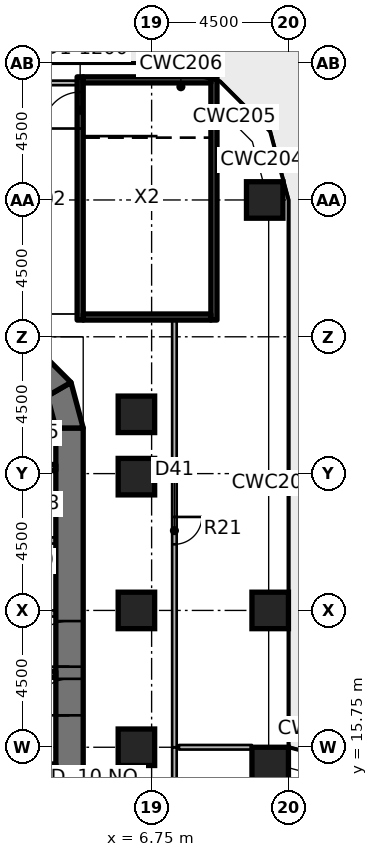
"""IFC4 building model, lengths in metres.
Left out: names, types, materials, properties, quantities, classifications, styles, units other than length and angle.
Written with IfcOpenShell. Run it as: python <this file> out.ifc"""

import sys

from ifc_helpers import new_model, si_unit, direction, frame, frame_2d, origin, origin_2d, place, context, subcontext, project, spatial, polyline, rectangle, outline, extrude, element, fill, save


model = new_model("IFC4")
c1 = context("Model", 3, precision=1e-05, world=origin(), true_north=direction((0.0, 1.0)))
c2 = subcontext(c1, "Body", "Model", "MODEL_VIEW")
j1 = project(units=[si_unit("LENGTHUNIT", "METRE"), si_unit("PLANEANGLEUNIT", "RADIAN")], contexts=[c1])
p1 = place(None, origin())
s1 = spatial("IfcSite", under=j1, at=p1, CompositionType="ELEMENT")
p2 = place(p1, origin())
s2 = spatial("IfcBuilding", under=s1, at=p2, CompositionType="ELEMENT")
p3 = place(p2, frame((0.0, 0.0, 22.0)))
s3 = spatial("IfcBuildingStorey", under=s2, at=p3, CompositionType="ELEMENT", Elevation=22.0)
for number, where, z_axis, x_axis in (
    (1, (6.25, 15.75, 0.0), (0.0, 0.0, 1.0), (1.0, 0.0, 0.0)),
    (2, (6.25, 20.25, 0.0), (0.0, 0.0, 1.0), (1.0, 0.0, 0.0)),
    (3, (6.25, 24.65, 0.0), (0.0, 0.0, 1.0), (1.0, 0.0, 0.0)),
    (4, (6.25, 26.7, 0.0), (0.0, 0.0, 1.0), (1.0, 0.0, 0.0)),
):
    element("IfcColumn", number, at=place(p3, frame(where, z_axis=z_axis, x_axis=x_axis)), inside=s3, PredefinedType="COLUMN", context=c2, shape_type="SweptSolid", body=[
        extrude(rectangle(XDim=1.2, YDim=1.2, at=origin_2d()), origin(), (0.0, 0.0, 1.0), 4.85),
    ])
for number, where, z_axis, x_axis in (
    (5, (10.65, 15.15, 0.0), (0.0, 0.0, 1.0), (1.0, 0.0, 0.0)),
    (6, (10.65, 20.25, 0.0), (0.0, 0.0, 1.0), (1.0, 0.0, 0.0)),
    (7, (10.47, 33.75, 0.0), (0.0, 0.0, 1.0), (1.0, 0.0, 0.0)),
):
    element("IfcColumn", number, at=place(p3, frame(where, z_axis=z_axis, x_axis=x_axis)), inside=s3, PredefinedType="COLUMN", context=c2, shape_type="SweptSolid", body=[
        extrude(rectangle(XDim=1.2, YDim=1.2, at=origin_2d()), origin(), (0.0, 0.0, 1.0), 4.55),
    ])
p4 = place(p3, frame((4.05, 11.25, 0.0), z_axis=(0.0, 0.0, 1.0), x_axis=(0.0, 1.0, 0.0)))
e8 = element("IfcWall", 8, at=p4, inside=s3, PredefinedType="SHEAR", context=c2, shape_type="SweptSolid", body=[
    extrude(rectangle(XDim=15.0, YDim=0.9, at=frame_2d((7.5, 0.0))), origin(), (0.0, 0.0, 1.0), 5.0),
])
p5 = place(p4, frame((7.15, 0.0, 0.0)))
e9 = element("IfcOpeningElement", 9, at=p5, cuts=e8, PredefinedType="OPENING", context=c2, shape_type="SweptSolid", body=[
    extrude(rectangle(XDim=1.5, YDim=2.3, at=frame_2d((0.75, 1.15))), frame((0.0, 0.46, 0.0), z_axis=(0.0, -1.0, 0.0), x_axis=(1.0, 0.0, 0.0)), (0.0, 0.0, 1.0), 0.92),
])
p6 = place(p4, frame((5.55, 0.0, 0.0)))
e10 = element("IfcOpeningElement", 10, at=p6, cuts=e8, PredefinedType="OPENING", context=c2, shape_type="SweptSolid", body=[
    extrude(rectangle(XDim=1.2, YDim=2.1, at=frame_2d((0.6, 1.05))), frame((0.0, 0.46, 0.0), z_axis=(0.0, -1.0, 0.0), x_axis=(1.0, 0.0, 0.0)), (0.0, 0.0, 1.0), 0.92),
])
p7 = place(p3, origin())
e11 = element("IfcWall", 11, at=p7, inside=s3, PredefinedType="SHEAR", context=c2, shape_type="SweptSolid", body=[
    extrude(outline(polyline([(4.5, 26.25), (4.098, 27.75), (3.319, 27.3), (3.6, 26.25), (4.5, 26.25)])), origin(), (0.0, 0.0, 1.0), 5.0),
])
p8 = place(p3, origin())
e12 = element("IfcWall", 12, at=p8, inside=s3, PredefinedType="SHEAR", context=c2, shape_type="SweptSolid", body=[
    extrude(outline(polyline([(4.098, 27.75), (3.0, 28.848), (2.55, 28.069), (3.319, 27.3), (4.098, 27.75)])), origin(), (0.0, 0.0, 1.0), 5.0),
])
for number, where, z_axis, x_axis in (
    (13, (-3.6, 24.95, 0.0), (0.0, 0.0, 1.0), (1.0, 0.0, 0.0)),
    (14, (-3.6, 18.15, 0.0), (0.0, 0.0, 1.0), (1.0, 0.0, 0.0)),
    (15, (-3.6, 15.1, 0.0), (0.0, 0.0, 1.0), (1.0, 0.0, 0.0)),
):
    element("IfcWall", number, at=place(p3, frame(where, z_axis=z_axis, x_axis=x_axis)), inside=s3, PredefinedType="SHEAR", context=c2, shape_type="SweptSolid", body=[
        extrude(rectangle(XDim=7.2, YDim=0.2, at=frame_2d((3.6, 0.0))), origin(), (0.0, 0.0, 1.0), 4.85),
    ])
p9 = place(p3, frame((0.9, 20.15, 0.0), z_axis=(0.0, 0.0, 1.0), x_axis=(1.0, 0.0, 0.0)))
e16 = element("IfcWall", 16, at=p9, inside=s3, PredefinedType="PARTITIONING", context=c2, shape_type="SweptSolid", body=[
    extrude(rectangle(XDim=2.7, YDim=0.2, at=frame_2d((1.35, 0.0))), origin(), (0.0, 0.0, 1.0), 4.85),
])
p10 = place(p3, frame((1.1, 22.55, 0.0), z_axis=(0.0, 0.0, 1.0), x_axis=(1.0, 0.0, 0.0)))
e17 = element("IfcWall", 17, at=p10, inside=s3, PredefinedType="PARTITIONING", context=c2, shape_type="SweptSolid", body=[
    extrude(rectangle(XDim=2.5, YDim=0.2, at=frame_2d((1.25, 0.0))), origin(), (0.0, 0.0, 1.0), 4.85),
])
p11 = place(p3, frame((4.4, 29.8, 0.0), z_axis=(0.0, 0.0, 1.0), x_axis=(0.0, 1.0, 0.0)))
e18 = element("IfcWall", 18, at=p11, inside=s3, PredefinedType="SHEAR", context=c2, shape_type="SweptSolid", body=[
    extrude(rectangle(XDim=8.0, YDim=0.2, at=frame_2d((4.0, 0.0))), origin(), (0.0, 0.0, 1.0), 4.55),
])
p12 = place(p11, frame((6.3, 0.0, 0.0)))
e19 = element("IfcOpeningElement", 19, at=p12, cuts=e18, PredefinedType="OPENING", context=c2, shape_type="SweptSolid", body=[
    extrude(rectangle(XDim=1.2, YDim=2.1, at=frame_2d((0.6, 1.05))), frame((0.0, 0.11, 0.0), z_axis=(0.0, -1.0, 0.0), x_axis=(1.0, 0.0, 0.0)), (0.0, 0.0, 1.0), 0.22),
])
p13 = place(p3, frame((8.8, 29.8, 0.0), z_axis=(0.0, 0.0, 1.0), x_axis=(0.0, 1.0, 0.0)))
e20 = element("IfcWall", 20, at=p13, inside=s3, PredefinedType="SHEAR", context=c2, shape_type="SweptSolid", body=[
    extrude(rectangle(XDim=8.0, YDim=0.2, at=frame_2d((4.0, 0.0))), origin(), (0.0, 0.0, 1.0), 4.55),
])
for number, where, z_axis, x_axis in (
    (21, (4.5, 29.9, 0.0), (0.0, 0.0, 1.0), (1.0, 0.0, 0.0)),
    (22, (4.5, 37.7, 0.0), (0.0, 0.0, 1.0), (1.0, 0.0, 0.0)),
):
    element("IfcWall", number, at=place(p3, frame(where, z_axis=z_axis, x_axis=x_axis)), inside=s3, PredefinedType="SHEAR", context=c2, shape_type="SweptSolid", body=[
        extrude(rectangle(XDim=4.2, YDim=0.2, at=frame_2d((2.1, 0.0))), origin(), (0.0, 0.0, 1.0), 4.55),
    ])
p14 = place(p3, frame((2.1, 37.6, 0.0), z_axis=(0.0, 0.0, 1.0), x_axis=(1.0, 0.0, 0.0)))
e23 = element("IfcWall", 23, at=p14, inside=s3, PredefinedType="PARTITIONING", context=c2, shape_type="SweptSolid", body=[
    extrude(rectangle(XDim=2.2, YDim=0.15, at=frame_2d((1.1, 0.0))), origin(), (0.0, 0.0, 1.0), 4.55),
])
p15 = place(p3, frame((7.5, 15.75, 0.0), z_axis=(0.0, 0.0, 1.0), x_axis=(0.0, -1.0, 0.0)))
e24 = element("IfcWall", 24, at=p15, inside=s3, PredefinedType="PARTITIONING", context=c2, shape_type="SweptSolid", body=[
    extrude(rectangle(XDim=7.5, YDim=0.15, at=frame_2d((3.75, 0.0))), origin(), (0.0, 0.0, 1.0), 3.93),
])
p16 = place(p15, frame((3.25, 0.0, 0.0)))
e25 = element("IfcOpeningElement", 25, at=p16, cuts=e24, PredefinedType="OPENING", context=c2, shape_type="SweptSolid", body=[
    extrude(rectangle(XDim=1.0, YDim=2.1, at=frame_2d((0.5, 1.05))), frame((0.0, 0.085, 0.0), z_axis=(0.0, -1.0, 0.0), x_axis=(1.0, 0.0, 0.0)), (0.0, 0.0, 1.0), 0.17),
])
p17 = place(p3, frame((7.5, 30.0, 0.0), z_axis=(0.0, 0.0, 1.0), x_axis=(0.0, -1.0, 0.0)))
e26 = element("IfcWall", 26, at=p17, inside=s3, PredefinedType="PARTITIONING", context=c2, shape_type="SweptSolid", body=[
    extrude(rectangle(XDim=14.25, YDim=0.15, at=frame_2d((7.125, 0.0))), origin(), (0.0, 0.0, 1.0), 4.55),
])
p18 = place(p17, frame((6.675, 0.0, 0.0)))
e27 = element("IfcOpeningElement", 27, at=p18, cuts=e26, PredefinedType="OPENING", context=c2, shape_type="SweptSolid", body=[
    extrude(rectangle(XDim=0.9, YDim=2.1, at=frame_2d((0.45, 1.05))), frame((0.0, 0.085, 0.0), z_axis=(0.0, -1.0, 0.0), x_axis=(1.0, 0.0, 0.0)), (0.0, 0.0, 1.0), 0.17),
])
p19 = place(p3, frame((7.65, 15.75, 0.0), z_axis=(0.0, 0.0, 1.0), x_axis=(1.0, 0.0, 0.0)))
e28 = element("IfcWall", 28, at=p19, inside=s3, PredefinedType="PARTITIONING", context=c2, shape_type="SweptSolid", body=[
    extrude(rectangle(XDim=2.4, YDim=0.15, at=frame_2d((1.2, 0.0))), origin(), (0.0, 0.0, 1.0), 4.55),
])
p20 = place(p5, origin())
e29 = element("IfcDoor", 29, at=p20, inside=s3, OperationType="DOUBLE_DOOR_SINGLE_SWING", PredefinedType="DOOR", context=c2, shape_type="SweptSolid", body=[
    extrude(rectangle(XDim=1.5, YDim=2.3, at=frame_2d((0.75, 1.15))), frame((0.0, 0.025, 0.0), z_axis=(0.0, -1.0, 0.0), x_axis=(1.0, 0.0, 0.0)), (0.0, 0.0, 1.0), 0.05),
])
fill(e9, e29)
p21 = place(p6, origin())
e30 = element("IfcDoor", 30, at=p21, inside=s3, OperationType="SINGLE_SWING_RIGHT", PredefinedType="DOOR", context=c2, shape_type="SweptSolid", body=[
    extrude(rectangle(XDim=1.2, YDim=2.1, at=frame_2d((0.6, 1.05))), frame((0.0, 0.025, 0.0), z_axis=(0.0, -1.0, 0.0), x_axis=(1.0, 0.0, 0.0)), (0.0, 0.0, 1.0), 0.05),
])
fill(e10, e30)
p22 = place(p12, origin())
e31 = element("IfcDoor", 31, at=p22, inside=s3, OperationType="SINGLE_SWING_LEFT", PredefinedType="DOOR", context=c2, shape_type="SweptSolid", body=[
    extrude(rectangle(XDim=1.2, YDim=2.1, at=frame_2d((0.6, 1.05))), frame((0.0, 0.025, 0.0), z_axis=(0.0, -1.0, 0.0), x_axis=(1.0, 0.0, 0.0)), (0.0, 0.0, 1.0), 0.05),
])
fill(e19, e31)
p23 = place(p18, origin())
e32 = element("IfcDoor", 32, at=p23, inside=s3, OperationType="SINGLE_SWING_LEFT", PredefinedType="DOOR", context=c2, shape_type="SweptSolid", body=[
    extrude(rectangle(XDim=0.9, YDim=2.1, at=frame_2d((0.45, 1.05))), frame((0.0, 0.025, 0.0), z_axis=(0.0, -1.0, 0.0), x_axis=(1.0, 0.0, 0.0)), (0.0, 0.0, 1.0), 0.05),
])
fill(e27, e32)
save(model, sys.argv[1])
